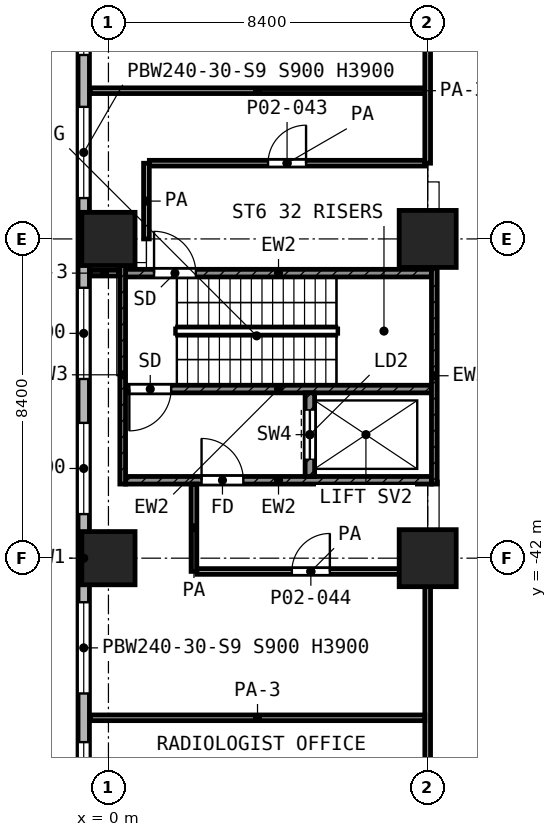
"""IFC4 building model, lengths in metres.
Left out: names, types, materials, properties, quantities, classifications, styles, units other than length and angle.
Written with IfcOpenShell. Run it as: python <this file> out.ifc"""

import sys

from ifc_helpers import new_model, si_unit, direction, frame, frame_2d, origin, origin_2d, place, context, subcontext, project, spatial, rectangle, extrude, element, fill, save


model = new_model("IFC4")
c1 = context("Model", 3, precision=1e-05, world=origin(), true_north=direction((0.0, 1.0)))
c2 = subcontext(c1, "Body", "Model", "MODEL_VIEW")
j1 = project(units=[si_unit("LENGTHUNIT", "METRE"), si_unit("PLANEANGLEUNIT", "RADIAN")], contexts=[c1])
p1 = place(None, origin())
s1 = spatial("IfcSite", under=j1, at=p1, CompositionType="ELEMENT")
p2 = place(p1, origin())
s2 = spatial("IfcBuilding", under=s1, at=p2, CompositionType="ELEMENT")
p3 = place(p2, frame((0.0, 0.0, 7.0)))
s3 = spatial("IfcBuildingStorey", under=s2, at=p3, CompositionType="ELEMENT", Elevation=7.0)
p4 = place(p3, frame((0.0, -33.6, 0.0), z_axis=(0.0, 0.0, 1.0), x_axis=(1.0, 0.0, 0.0)))
e1 = element("IfcColumn", 1, at=p4, inside=s3, PredefinedType="COLUMN", context=c2, shape_type="SweptSolid", body=[
    extrude(rectangle(XDim=1.4, YDim=1.4, at=origin_2d()), origin(), (0.0, 0.0, 1.0), 5.6),
])
p5 = place(p3, frame((8.4, -33.6, 0.0), z_axis=(0.0, 0.0, 1.0), x_axis=(1.0, 0.0, 0.0)))
e2 = element("IfcColumn", 2, at=p5, inside=s3, PredefinedType="COLUMN", context=c2, shape_type="SweptSolid", body=[
    extrude(rectangle(XDim=1.5, YDim=1.5, at=origin_2d()), origin(), (0.0, 0.0, 1.0), 5.6),
])
p6 = place(p3, frame((0.0, -42.0, 0.0), z_axis=(0.0, 0.0, 1.0), x_axis=(1.0, 0.0, 0.0)))
e3 = element("IfcColumn", 3, at=p6, inside=s3, PredefinedType="COLUMN", context=c2, shape_type="SweptSolid", body=[
    extrude(rectangle(XDim=1.4, YDim=1.4, at=origin_2d()), origin(), (0.0, 0.0, 1.0), 5.6),
])
p7 = place(p3, frame((8.4, -42.0, 0.0), z_axis=(0.0, 0.0, 1.0), x_axis=(1.0, 0.0, 0.0)))
e4 = element("IfcColumn", 4, at=p7, inside=s3, PredefinedType="COLUMN", context=c2, shape_type="SweptSolid", body=[
    extrude(rectangle(XDim=1.5, YDim=1.5, at=origin_2d()), origin(), (0.0, 0.0, 1.0), 5.6),
])
p8 = place(p3, frame((-0.65, -5.262, 0.0), z_axis=(0.0, 0.0, 1.0), x_axis=(0.0, -1.0, 0.0)))
e5 = element("IfcWall", 5, at=p8, inside=s3, PredefinedType="SOLIDWALL", context=c2, shape_type="SweptSolid", body=[
    extrude(rectangle(XDim=73.476, YDim=0.3, at=frame_2d((36.738, 0.0))), origin(), (0.0, 0.0, 1.0), 5.25),
])
p9 = place(p8, frame((1.61, 0.0, 0.9)))
e6 = element("IfcOpeningElement", 6, at=p9, cuts=e5, PredefinedType="OPENING", context=c2, shape_type="SweptSolid", body=[
    extrude(rectangle(XDim=1.2, YDim=3.0, at=frame_2d((0.6, 1.5))), frame((0.0, 0.16, 0.0), z_axis=(0.0, -1.0, 0.0), x_axis=(1.0, 0.0, 0.0)), (0.0, 0.0, 1.0), 0.32),
])
p10 = place(p8, frame((4.123, 0.0, 0.9)))
e7 = element("IfcOpeningElement", 7, at=p10, cuts=e5, PredefinedType="OPENING", context=c2, shape_type="SweptSolid", body=[
    extrude(rectangle(XDim=2.4, YDim=3.0, at=frame_2d((1.2, 1.5))), frame((0.0, 0.16, 0.0), z_axis=(0.0, -1.0, 0.0), x_axis=(1.0, 0.0, 0.0)), (0.0, 0.0, 1.0), 0.32),
])
p11 = place(p8, frame((7.978, 0.0, 0.9)))
e8 = element("IfcOpeningElement", 8, at=p11, cuts=e5, PredefinedType="OPENING", context=c2, shape_type="SweptSolid", body=[
    extrude(rectangle(XDim=2.4, YDim=3.0, at=frame_2d((1.2, 1.5))), frame((0.0, 0.16, 0.0), z_axis=(0.0, -1.0, 0.0), x_axis=(1.0, 0.0, 0.0)), (0.0, 0.0, 1.0), 0.32),
])
p12 = place(p8, frame((12.698, 0.0, 0.9)))
e9 = element("IfcOpeningElement", 9, at=p12, cuts=e5, PredefinedType="OPENING", context=c2, shape_type="SweptSolid", body=[
    extrude(rectangle(XDim=2.4, YDim=3.0, at=frame_2d((1.2, 1.5))), frame((0.0, 0.16, 0.0), z_axis=(0.0, -1.0, 0.0), x_axis=(1.0, 0.0, 0.0)), (0.0, 0.0, 1.0), 0.32),
])
p13 = place(p8, frame((16.378, 0.0, 0.9)))
e10 = element("IfcOpeningElement", 10, at=p13, cuts=e5, PredefinedType="OPENING", context=c2, shape_type="SweptSolid", body=[
    extrude(rectangle(XDim=2.4, YDim=3.0, at=frame_2d((1.2, 1.5))), frame((0.0, 0.16, 0.0), z_axis=(0.0, -1.0, 0.0), x_axis=(1.0, 0.0, 0.0)), (0.0, 0.0, 1.0), 0.32),
])
p14 = place(p8, frame((21.098, 0.0, 0.9)))
e11 = element("IfcOpeningElement", 11, at=p14, cuts=e5, PredefinedType="OPENING", context=c2, shape_type="SweptSolid", body=[
    extrude(rectangle(XDim=2.4, YDim=3.0, at=frame_2d((1.2, 1.5))), frame((0.0, 0.16, 0.0), z_axis=(0.0, -1.0, 0.0), x_axis=(1.0, 0.0, 0.0)), (0.0, 0.0, 1.0), 0.32),
])
p15 = place(p8, frame((24.863, 0.0, 0.9)))
e12 = element("IfcOpeningElement", 12, at=p15, cuts=e5, PredefinedType="OPENING", context=c2, shape_type="SweptSolid", body=[
    extrude(rectangle(XDim=2.4, YDim=3.0, at=frame_2d((1.2, 1.5))), frame((0.0, 0.16, 0.0), z_axis=(0.0, -1.0, 0.0), x_axis=(1.0, 0.0, 0.0)), (0.0, 0.0, 1.0), 0.32),
])
p16 = place(p8, frame((29.623, 0.0, 0.9)))
e13 = element("IfcOpeningElement", 13, at=p16, cuts=e5, PredefinedType="OPENING", context=c2, shape_type="SweptSolid", body=[
    extrude(rectangle(XDim=2.4, YDim=3.0, at=frame_2d((1.2, 1.5))), frame((0.0, 0.16, 0.0), z_axis=(0.0, -1.0, 0.0), x_axis=(1.0, 0.0, 0.0)), (0.0, 0.0, 1.0), 0.32),
])
p17 = place(p8, frame((33.178, 0.0, 0.9)))
e14 = element("IfcOpeningElement", 14, at=p17, cuts=e5, PredefinedType="OPENING", context=c2, shape_type="SweptSolid", body=[
    extrude(rectangle(XDim=2.4, YDim=3.0, at=frame_2d((1.2, 1.5))), frame((0.0, 0.16, 0.0), z_axis=(0.0, -1.0, 0.0), x_axis=(1.0, 0.0, 0.0)), (0.0, 0.0, 1.0), 0.32),
])
p18 = place(p8, frame((37.898, 0.0, 0.9)))
e15 = element("IfcOpeningElement", 15, at=p18, cuts=e5, PredefinedType="OPENING", context=c2, shape_type="SweptSolid", body=[
    extrude(rectangle(XDim=2.4, YDim=3.0, at=frame_2d((1.2, 1.5))), frame((0.0, 0.16, 0.0), z_axis=(0.0, -1.0, 0.0), x_axis=(1.0, 0.0, 0.0)), (0.0, 0.0, 1.0), 0.32),
])
p19 = place(p8, frame((41.578, 0.0, 0.9)))
e16 = element("IfcOpeningElement", 16, at=p19, cuts=e5, PredefinedType="OPENING", context=c2, shape_type="SweptSolid", body=[
    extrude(rectangle(XDim=2.4, YDim=3.0, at=frame_2d((1.2, 1.5))), frame((0.0, 0.16, 0.0), z_axis=(0.0, -1.0, 0.0), x_axis=(1.0, 0.0, 0.0)), (0.0, 0.0, 1.0), 0.32),
])
p20 = place(p8, frame((46.298, 0.0, 0.9)))
e17 = element("IfcOpeningElement", 17, at=p20, cuts=e5, PredefinedType="OPENING", context=c2, shape_type="SweptSolid", body=[
    extrude(rectangle(XDim=2.4, YDim=3.0, at=frame_2d((1.2, 1.5))), frame((0.0, 0.16, 0.0), z_axis=(0.0, -1.0, 0.0), x_axis=(1.0, 0.0, 0.0)), (0.0, 0.0, 1.0), 0.32),
])
p21 = place(p8, frame((50.213, 0.0, 0.9)))
e18 = element("IfcOpeningElement", 18, at=p21, cuts=e5, PredefinedType="OPENING", context=c2, shape_type="SweptSolid", body=[
    extrude(rectangle(XDim=2.4, YDim=3.0, at=frame_2d((1.2, 1.5))), frame((0.0, 0.16, 0.0), z_axis=(0.0, -1.0, 0.0), x_axis=(1.0, 0.0, 0.0)), (0.0, 0.0, 1.0), 0.32),
])
p22 = place(p8, frame((54.613, 0.0, 0.9)))
e19 = element("IfcOpeningElement", 19, at=p22, cuts=e5, PredefinedType="OPENING", context=c2, shape_type="SweptSolid", body=[
    extrude(rectangle(XDim=2.4, YDim=3.0, at=frame_2d((1.2, 1.5))), frame((0.0, 0.16, 0.0), z_axis=(0.0, -1.0, 0.0), x_axis=(1.0, 0.0, 0.0)), (0.0, 0.0, 1.0), 0.32),
])
p23 = place(p8, frame((58.378, 0.0, 0.9)))
e20 = element("IfcOpeningElement", 20, at=p23, cuts=e5, PredefinedType="OPENING", context=c2, shape_type="SweptSolid", body=[
    extrude(rectangle(XDim=2.4, YDim=3.0, at=frame_2d((1.2, 1.5))), frame((0.0, 0.16, 0.0), z_axis=(0.0, -1.0, 0.0), x_axis=(1.0, 0.0, 0.0)), (0.0, 0.0, 1.0), 0.32),
])
p24 = place(p8, frame((63.098, 0.0, 0.9)))
e21 = element("IfcOpeningElement", 21, at=p24, cuts=e5, PredefinedType="OPENING", context=c2, shape_type="SweptSolid", body=[
    extrude(rectangle(XDim=2.4, YDim=3.0, at=frame_2d((1.2, 1.5))), frame((0.0, 0.16, 0.0), z_axis=(0.0, -1.0, 0.0), x_axis=(1.0, 0.0, 0.0)), (0.0, 0.0, 1.0), 0.32),
])
p25 = place(p8, frame((66.838, 0.0, 0.9)))
e22 = element("IfcOpeningElement", 22, at=p25, cuts=e5, PredefinedType="OPENING", context=c2, shape_type="SweptSolid", body=[
    extrude(rectangle(XDim=1.2, YDim=3.0, at=frame_2d((0.6, 1.5))), frame((0.0, 0.16, 0.0), z_axis=(0.0, -1.0, 0.0), x_axis=(1.0, 0.0, 0.0)), (0.0, 0.0, 1.0), 0.32),
])
p26 = place(p8, frame((70.665, 0.0, 0.9)))
e23 = element("IfcOpeningElement", 23, at=p26, cuts=e5, PredefinedType="OPENING", context=c2, shape_type="SweptSolid", body=[
    extrude(rectangle(XDim=1.2, YDim=3.0, at=frame_2d((0.6, 1.5))), frame((0.0, 0.16, 0.0), z_axis=(0.0, -1.0, 0.0), x_axis=(1.0, 0.0, 0.0)), (0.0, 0.0, 1.0), 0.32),
])
p27 = place(p3, frame((0.375, -40.05, 0.0), z_axis=(0.0, 0.0, 1.0), x_axis=(0.0, 1.0, 0.0)))
e24 = element("IfcWall", 24, at=p27, inside=s3, PredefinedType="SHEAR", context=c2, shape_type="SweptSolid", body=[
    extrude(rectangle(XDim=5.75, YDim=0.15, at=frame_2d((2.875, 0.0))), origin(), (0.0, 0.0, 1.0), 5.25),
])
p28 = place(p3, frame((8.575, -40.05, 0.0), z_axis=(0.0, 0.0, 1.0), x_axis=(0.0, 1.0, 0.0)))
e25 = element("IfcWall", 25, at=p28, inside=s3, PredefinedType="SHEAR", context=c2, shape_type="SweptSolid", body=[
    extrude(rectangle(XDim=5.7, YDim=0.15, at=frame_2d((2.85, 0.0))), origin(), (0.0, 0.0, 1.0), 5.25),
])
p29 = place(p3, frame((0.45, -34.5, 0.0), z_axis=(0.0, 0.0, 1.0), x_axis=(1.0, 0.0, 0.0)))
e26 = element("IfcWall", 26, at=p29, inside=s3, PredefinedType="SHEAR", context=c2, shape_type="SweptSolid", body=[
    extrude(rectangle(XDim=8.05, YDim=0.2, at=frame_2d((4.025, 0.0))), origin(), (0.0, 0.0, 1.0), 5.25),
])
p30 = place(p29, frame((0.75, 0.0, 0.0)))
e27 = element("IfcOpeningElement", 27, at=p30, cuts=e26, PredefinedType="OPENING", context=c2, shape_type="SweptSolid", body=[
    extrude(rectangle(XDim=1.1, YDim=2.1, at=frame_2d((0.55, 1.05))), frame((0.0, 0.11, 0.0), z_axis=(0.0, -1.0, 0.0), x_axis=(1.0, 0.0, 0.0)), (0.0, 0.0, 1.0), 0.22),
])
p31 = place(p3, frame((0.45, -37.55, 0.0), z_axis=(0.0, 0.0, 1.0), x_axis=(1.0, 0.0, 0.0)))
e28 = element("IfcWall", 28, at=p31, inside=s3, PredefinedType="SHEAR", context=c2, shape_type="SweptSolid", body=[
    extrude(rectangle(XDim=8.05, YDim=0.2, at=frame_2d((4.025, 0.0))), origin(), (0.0, 0.0, 1.0), 5.25),
])
p32 = place(p31, frame((0.1, 0.0, 0.0)))
e29 = element("IfcOpeningElement", 29, at=p32, cuts=e28, PredefinedType="OPENING", context=c2, shape_type="SweptSolid", body=[
    extrude(rectangle(XDim=1.1, YDim=2.1, at=frame_2d((0.55, 1.05))), frame((0.0, 0.11, 0.0), z_axis=(0.0, -1.0, 0.0), x_axis=(1.0, 0.0, 0.0)), (0.0, 0.0, 1.0), 0.22),
])
p33 = place(p3, frame((0.45, -39.95, 0.0), z_axis=(0.0, 0.0, 1.0), x_axis=(1.0, 0.0, 0.0)))
e30 = element("IfcWall", 30, at=p33, inside=s3, PredefinedType="SHEAR", context=c2, shape_type="SweptSolid", body=[
    extrude(rectangle(XDim=8.05, YDim=0.2, at=frame_2d((4.025, 0.0))), origin(), (0.0, 0.0, 1.0), 5.25),
])
p34 = place(p33, frame((2.0, 0.0, 0.0)))
e31 = element("IfcOpeningElement", 31, at=p34, cuts=e30, PredefinedType="OPENING", context=c2, shape_type="SweptSolid", body=[
    extrude(rectangle(XDim=1.1, YDim=2.1, at=frame_2d((0.55, 1.05))), frame((0.0, 0.11, 0.0), z_axis=(0.0, -1.0, 0.0), x_axis=(1.0, 0.0, 0.0)), (0.0, 0.0, 1.0), 0.22),
])
p35 = place(p3, frame((5.3, -39.85, 0.0), z_axis=(0.0, 0.0, 1.0), x_axis=(0.0, 1.0, 0.0)))
e32 = element("IfcWall", 32, at=p35, inside=s3, PredefinedType="SHEAR", context=c2, shape_type="SweptSolid", body=[
    extrude(rectangle(XDim=2.2, YDim=0.25, at=frame_2d((1.1, 0.0))), origin(), (0.0, 0.0, 1.0), 5.25),
])
p36 = place(p35, frame((0.45, 0.0, 0.0)))
e33 = element("IfcOpeningElement", 33, at=p36, cuts=e32, PredefinedType="OPENING", context=c2, shape_type="SweptSolid", body=[
    extrude(rectangle(XDim=1.3, YDim=2.1, at=frame_2d((0.65, 1.05))), frame((0.0, 0.135, 0.0), z_axis=(0.0, -1.0, 0.0), x_axis=(1.0, 0.0, 0.0)), (0.0, 0.0, 1.0), 0.27),
])
p37 = place(p3, frame((-0.48, -46.2, 0.0), z_axis=(0.0, 0.0, 1.0), x_axis=(1.0, 0.0, 0.0)))
e34 = element("IfcWall", 34, at=p37, inside=s3, PredefinedType="PARTITIONING", context=c2, shape_type="SweptSolid", body=[
    extrude(rectangle(XDim=8.805, YDim=0.15, at=frame_2d((4.402, 0.0))), origin(), (0.0, 0.0, 1.0), 3.85),
])
p38 = place(p3, frame((2.327, -42.35, 0.0), z_axis=(0.0, 0.0, 1.0), x_axis=(1.0, 0.0, 0.0)))
e35 = element("IfcWall", 35, at=p38, inside=s3, PredefinedType="PARTITIONING", context=c2, shape_type="SweptSolid", body=[
    extrude(rectangle(XDim=5.998, YDim=0.15, at=frame_2d((2.999, 0.0))), origin(), (0.0, 0.0, 1.0), 5.25),
])
p39 = place(p38, frame((2.499, 0.0, 0.0)))
e36 = element("IfcOpeningElement", 36, at=p39, cuts=e35, PredefinedType="OPENING", context=c2, shape_type="SweptSolid", body=[
    extrude(rectangle(XDim=1.0, YDim=2.1, at=frame_2d((0.5, 1.05))), frame((0.0, 0.085, 0.0), z_axis=(0.0, -1.0, 0.0), x_axis=(1.0, 0.0, 0.0)), (0.0, 0.0, 1.0), 0.17),
])
p40 = place(p3, frame((-0.48, -34.5, 0.0), z_axis=(0.0, 0.0, 1.0), x_axis=(1.0, 0.0, 0.0)))
e37 = element("IfcWall", 37, at=p40, inside=s3, PredefinedType="PARTITIONING", context=c2, shape_type="SweptSolid", body=[
    extrude(rectangle(XDim=0.75, YDim=0.15, at=frame_2d((0.375, 0.0))), origin(), (0.0, 0.0, 1.0), 3.85),
])
p41 = place(p3, frame((1.076, -31.607, 0.0), z_axis=(0.0, 0.0, 1.0), x_axis=(1.0, 0.0, 0.0)))
e38 = element("IfcWall", 38, at=p41, inside=s3, PredefinedType="PARTITIONING", context=c2, shape_type="SweptSolid", body=[
    extrude(rectangle(XDim=7.249, YDim=0.15, at=frame_2d((3.625, 0.0))), origin(), (0.0, 0.0, 1.0), 5.25),
])
p42 = place(p41, frame((3.124, 0.0, 0.0)))
e39 = element("IfcOpeningElement", 39, at=p42, cuts=e38, PredefinedType="OPENING", context=c2, shape_type="SweptSolid", body=[
    extrude(rectangle(XDim=1.0, YDim=2.1, at=frame_2d((0.5, 1.05))), frame((0.0, 0.085, 0.0), z_axis=(0.0, -1.0, 0.0), x_axis=(1.0, 0.0, 0.0)), (0.0, 0.0, 1.0), 0.17),
])
p43 = place(p3, frame((-0.48, -29.7, 0.0), z_axis=(0.0, 0.0, 1.0), x_axis=(1.0, 0.0, 0.0)))
e40 = element("IfcWall", 40, at=p43, inside=s3, PredefinedType="PARTITIONING", context=c2, shape_type="SweptSolid", body=[
    extrude(rectangle(XDim=8.805, YDim=0.15, at=frame_2d((4.402, 0.0))), origin(), (0.0, 0.0, 1.0), 3.85),
])
p44 = place(p3, frame((1.0, -33.6, 0.0), z_axis=(0.0, 0.0, 1.0), x_axis=(0.0, 1.0, 0.0)))
e41 = element("IfcWall", 41, at=p44, inside=s3, PredefinedType="PARTITIONING", context=c2, shape_type="SweptSolid", body=[
    extrude(rectangle(XDim=1.991, YDim=0.15, at=frame_2d((0.996, 0.0))), origin(), (0.0, 0.0, 1.0), 5.25),
])
p45 = place(p3, frame((2.25, -42.348, 0.0), z_axis=(0.0, 0.0, 1.0), x_axis=(0.0, 1.0, 0.0)))
e42 = element("IfcWall", 42, at=p45, inside=s3, PredefinedType="PARTITIONING", context=c2, shape_type="SweptSolid", body=[
    extrude(rectangle(XDim=2.298, YDim=0.15, at=frame_2d((1.149, 0.0))), origin(), (0.0, 0.0, 1.0), 5.25),
])
p46 = place(p3, frame((8.4, -67.947, 0.0), z_axis=(0.0, 0.0, 1.0), x_axis=(0.0, 1.0, 0.0)))
e43 = element("IfcWall", 43, at=p46, inside=s3, PredefinedType="PARTITIONING", context=c2, shape_type="SweptSolid", body=[
    extrude(rectangle(XDim=25.597, YDim=0.15, at=frame_2d((12.798, 0.0))), origin(), (0.0, 0.0, 1.0), 5.25),
])
p47 = place(p46, frame((19.147, 0.0, 0.0)))
e44 = element("IfcOpeningElement", 44, at=p47, cuts=e43, PredefinedType="OPENING", context=c2, shape_type="SweptSolid", body=[
    extrude(rectangle(XDim=1.0, YDim=2.1, at=frame_2d((0.5, 1.05))), frame((0.0, 0.085, 0.0), z_axis=(0.0, -1.0, 0.0), x_axis=(1.0, 0.0, 0.0)), (0.0, 0.0, 1.0), 0.17),
])
p48 = place(p46, frame((14.647, 0.0, 0.0)))
e45 = element("IfcOpeningElement", 45, at=p48, cuts=e43, PredefinedType="OPENING", context=c2, shape_type="SweptSolid", body=[
    extrude(rectangle(XDim=1.0, YDim=2.1, at=frame_2d((0.5, 1.05))), frame((0.0, 0.085, 0.0), z_axis=(0.0, -1.0, 0.0), x_axis=(1.0, 0.0, 0.0)), (0.0, 0.0, 1.0), 0.17),
])
p49 = place(p46, frame((10.447, 0.0, 0.0)))
e46 = element("IfcOpeningElement", 46, at=p49, cuts=e43, PredefinedType="OPENING", context=c2, shape_type="SweptSolid", body=[
    extrude(rectangle(XDim=1.0, YDim=2.1, at=frame_2d((0.5, 1.05))), frame((0.0, 0.085, 0.0), z_axis=(0.0, -1.0, 0.0), x_axis=(1.0, 0.0, 0.0)), (0.0, 0.0, 1.0), 0.17),
])
p50 = place(p46, frame((6.697, 0.0, 0.0)))
e47 = element("IfcOpeningElement", 47, at=p50, cuts=e43, PredefinedType="OPENING", context=c2, shape_type="SweptSolid", body=[
    extrude(rectangle(XDim=1.0, YDim=2.1, at=frame_2d((0.5, 1.05))), frame((0.0, 0.085, 0.0), z_axis=(0.0, -1.0, 0.0), x_axis=(1.0, 0.0, 0.0)), (0.0, 0.0, 1.0), 0.17),
])
p51 = place(p46, frame((2.124, 0.0, 0.0)))
e48 = element("IfcOpeningElement", 48, at=p51, cuts=e43, PredefinedType="OPENING", context=c2, shape_type="SweptSolid", body=[
    extrude(rectangle(XDim=1.0, YDim=2.1, at=frame_2d((0.5, 1.05))), frame((0.0, 0.085, 0.0), z_axis=(0.0, -1.0, 0.0), x_axis=(1.0, 0.0, 0.0)), (0.0, 0.0, 1.0), 0.17),
])
p52 = place(p3, frame((8.4, -31.607, 0.0), z_axis=(0.0, 0.0, 1.0), x_axis=(0.0, 1.0, 0.0)))
e49 = element("IfcWall", 49, at=p52, inside=s3, PredefinedType="PARTITIONING", context=c2, shape_type="SweptSolid", body=[
    extrude(rectangle(XDim=6.407, YDim=0.15, at=frame_2d((3.204, 0.0))), origin(), (0.0, 0.0, 1.0), 5.25),
])
p53 = place(p52, frame((3.657, 0.0, 0.0)))
e50 = element("IfcOpeningElement", 50, at=p53, cuts=e49, PredefinedType="OPENING", context=c2, shape_type="SweptSolid", body=[
    extrude(rectangle(XDim=1.0, YDim=2.1, at=frame_2d((0.5, 1.05))), frame((0.0, 0.085, 0.0), z_axis=(0.0, -1.0, 0.0), x_axis=(1.0, 0.0, 0.0)), (0.0, 0.0, 1.0), 0.17),
])
p54 = place(p14, origin())
e51 = element("IfcWindow", 51, at=p54, inside=s3, PartitioningType="SINGLE_PANEL", PredefinedType="WINDOW", context=c2, shape_type="SweptSolid", body=[
    extrude(rectangle(XDim=2.4, YDim=3.0, at=frame_2d((1.2, 1.5))), frame((0.0, 0.03, 0.0), z_axis=(0.0, -1.0, 0.0), x_axis=(1.0, 0.0, 0.0)), (0.0, 0.0, 1.0), 0.06),
])
fill(e11, e51)
p55 = place(p15, origin())
e52 = element("IfcWindow", 52, at=p55, inside=s3, PartitioningType="SINGLE_PANEL", PredefinedType="WINDOW", context=c2, shape_type="SweptSolid", body=[
    extrude(rectangle(XDim=2.4, YDim=3.0, at=frame_2d((1.2, 1.5))), frame((0.0, 0.03, 0.0), z_axis=(0.0, -1.0, 0.0), x_axis=(1.0, 0.0, 0.0)), (0.0, 0.0, 1.0), 0.06),
])
fill(e12, e52)
p56 = place(p16, origin())
e53 = element("IfcWindow", 53, at=p56, inside=s3, PartitioningType="SINGLE_PANEL", PredefinedType="WINDOW", context=c2, shape_type="SweptSolid", body=[
    extrude(rectangle(XDim=2.4, YDim=3.0, at=frame_2d((1.2, 1.5))), frame((0.0, 0.03, 0.0), z_axis=(0.0, -1.0, 0.0), x_axis=(1.0, 0.0, 0.0)), (0.0, 0.0, 1.0), 0.06),
])
fill(e13, e53)
p57 = place(p17, origin())
e54 = element("IfcWindow", 54, at=p57, inside=s3, PartitioningType="SINGLE_PANEL", PredefinedType="WINDOW", context=c2, shape_type="SweptSolid", body=[
    extrude(rectangle(XDim=2.4, YDim=3.0, at=frame_2d((1.2, 1.5))), frame((0.0, 0.03, 0.0), z_axis=(0.0, -1.0, 0.0), x_axis=(1.0, 0.0, 0.0)), (0.0, 0.0, 1.0), 0.06),
])
fill(e14, e54)
p58 = place(p18, origin())
e55 = element("IfcWindow", 55, at=p58, inside=s3, PartitioningType="SINGLE_PANEL", PredefinedType="WINDOW", context=c2, shape_type="SweptSolid", body=[
    extrude(rectangle(XDim=2.4, YDim=3.0, at=frame_2d((1.2, 1.5))), frame((0.0, 0.03, 0.0), z_axis=(0.0, -1.0, 0.0), x_axis=(1.0, 0.0, 0.0)), (0.0, 0.0, 1.0), 0.06),
])
fill(e15, e55)
p59 = place(p19, origin())
e56 = element("IfcWindow", 56, at=p59, inside=s3, PartitioningType="SINGLE_PANEL", PredefinedType="WINDOW", context=c2, shape_type="SweptSolid", body=[
    extrude(rectangle(XDim=2.4, YDim=3.0, at=frame_2d((1.2, 1.5))), frame((0.0, 0.03, 0.0), z_axis=(0.0, -1.0, 0.0), x_axis=(1.0, 0.0, 0.0)), (0.0, 0.0, 1.0), 0.06),
])
fill(e16, e56)
p60 = place(p30, origin())
e57 = element("IfcDoor", 57, at=p60, inside=s3, OperationType="SINGLE_SWING_LEFT", PredefinedType="DOOR", context=c2, shape_type="SweptSolid", body=[
    extrude(rectangle(XDim=1.1, YDim=2.1, at=frame_2d((0.55, 1.05))), frame((0.0, 0.025, 0.0), z_axis=(0.0, -1.0, 0.0), x_axis=(1.0, 0.0, 0.0)), (0.0, 0.0, 1.0), 0.05),
])
fill(e27, e57)
p61 = place(p32, frame((1.1, 0.0, 0.0), z_axis=(0.0, 0.0, 1.0), x_axis=(-1.0, 0.0, 0.0)))
e58 = element("IfcDoor", 58, at=p61, inside=s3, OperationType="SINGLE_SWING_LEFT", PredefinedType="DOOR", context=c2, shape_type="SweptSolid", body=[
    extrude(rectangle(XDim=1.1, YDim=2.1, at=frame_2d((0.55, 1.05))), frame((0.0, 0.025, 0.0), z_axis=(0.0, -1.0, 0.0), x_axis=(1.0, 0.0, 0.0)), (0.0, 0.0, 1.0), 0.05),
])
fill(e29, e58)
p62 = place(p36, origin())
e59 = element("IfcDoor", 59, at=p62, inside=s3, OperationType="DOUBLE_DOOR_SLIDING", PredefinedType="DOOR", context=c2, shape_type="SweptSolid", body=[
    extrude(rectangle(XDim=1.3, YDim=2.1, at=frame_2d((0.65, 1.05))), frame((0.0, 0.025, 0.0), z_axis=(0.0, -1.0, 0.0), x_axis=(1.0, 0.0, 0.0)), (0.0, 0.0, 1.0), 0.05),
])
fill(e33, e59)
p63 = place(p34, origin())
e60 = element("IfcDoor", 60, at=p63, inside=s3, OperationType="SINGLE_SWING_LEFT", PredefinedType="DOOR", context=c2, shape_type="SweptSolid", body=[
    extrude(rectangle(XDim=1.1, YDim=2.1, at=frame_2d((0.55, 1.05))), frame((0.0, 0.025, 0.0), z_axis=(0.0, -1.0, 0.0), x_axis=(1.0, 0.0, 0.0)), (0.0, 0.0, 1.0), 0.05),
])
fill(e31, e60)
p64 = place(p42, origin())
e61 = element("IfcDoor", 61, at=p64, inside=s3, OperationType="SINGLE_SWING_RIGHT", PredefinedType="DOOR", context=c2, shape_type="SweptSolid", body=[
    extrude(rectangle(XDim=1.0, YDim=2.1, at=frame_2d((0.5, 1.05))), frame((0.0, 0.025, 0.0), z_axis=(0.0, -1.0, 0.0), x_axis=(1.0, 0.0, 0.0)), (0.0, 0.0, 1.0), 0.05),
])
fill(e39, e61)
p65 = place(p39, origin())
e62 = element("IfcDoor", 62, at=p65, inside=s3, OperationType="SINGLE_SWING_RIGHT", PredefinedType="DOOR", context=c2, shape_type="SweptSolid", body=[
    extrude(rectangle(XDim=1.0, YDim=2.1, at=frame_2d((0.5, 1.05))), frame((0.0, 0.025, 0.0), z_axis=(0.0, -1.0, 0.0), x_axis=(1.0, 0.0, 0.0)), (0.0, 0.0, 1.0), 0.05),
])
fill(e36, e62)
save(model, sys.argv[1])
